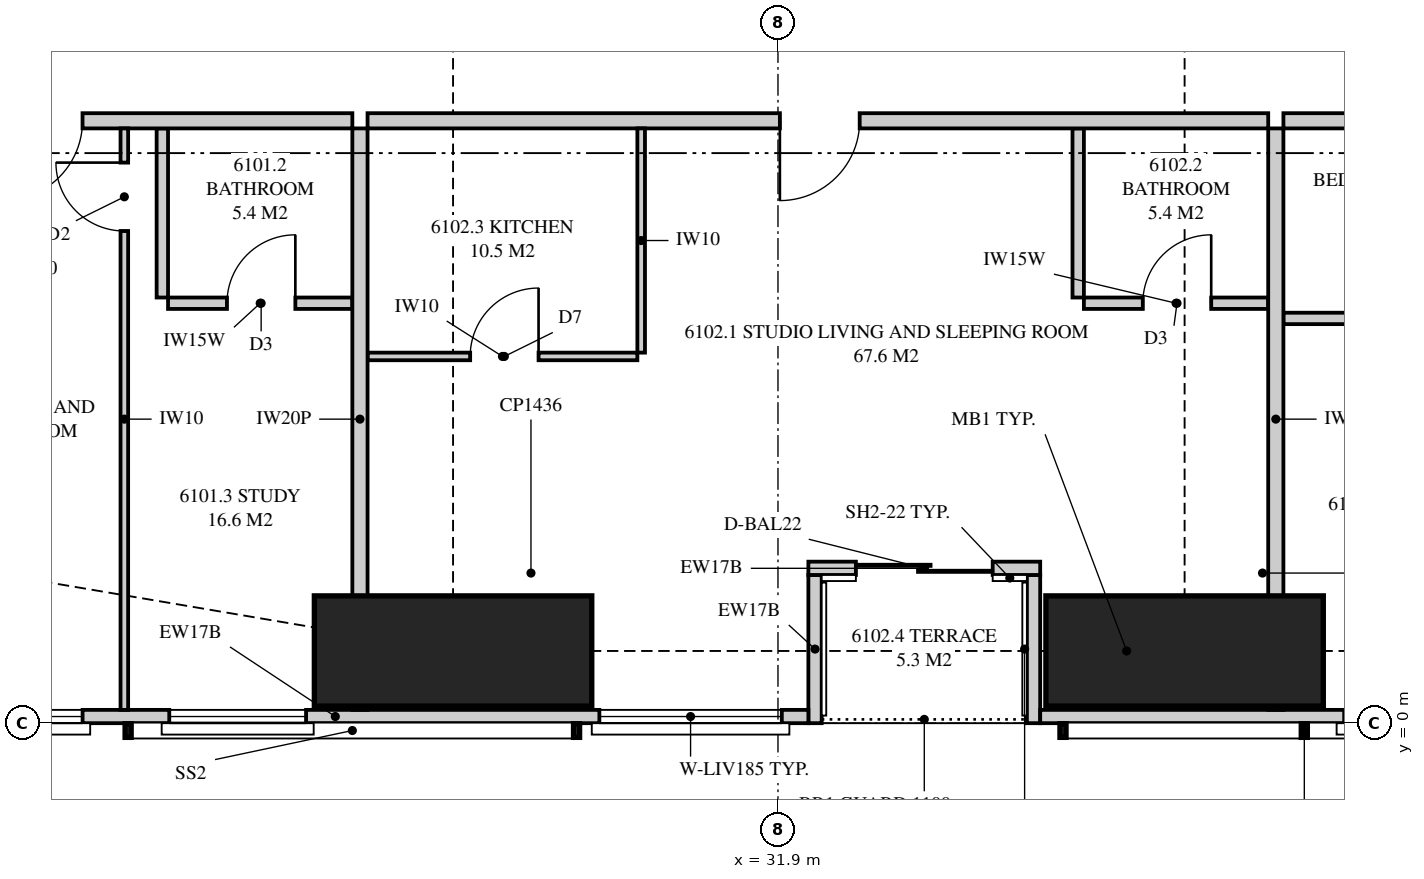
"""IFC4 building model, lengths in metres.
Left out: names, types, materials, properties, quantities, classifications, styles, units other than length and angle.
Written with IfcOpenShell. Run it as: python <this file> out.ifc"""

import sys

from ifc_helpers import new_model, si_unit, direction, frame, frame_2d, origin, origin_2d, place, context, subcontext, project, spatial, polyline, rectangle, outline, extrude, element, fill, save


model = new_model("IFC4")
c1 = context("Model", 3, precision=1e-05, world=origin(), true_north=direction((0.0, 1.0)))
c2 = subcontext(c1, "Body", "Model", "MODEL_VIEW")
j1 = project(units=[si_unit("LENGTHUNIT", "METRE"), si_unit("PLANEANGLEUNIT", "RADIAN")], contexts=[c1])
p1 = place(None, origin())
s1 = spatial("IfcSite", under=j1, at=p1, CompositionType="ELEMENT")
p2 = place(p1, origin())
s2 = spatial("IfcBuilding", under=s1, at=p2, CompositionType="ELEMENT")
p3 = place(p2, frame((0.0, 0.0, 224.95)))
s3 = spatial("IfcBuildingStorey", under=s2, at=p3, CompositionType="ELEMENT", Elevation=224.95)
for number, where, z_axis, x_axis in (
    (1, (27.625, 0.95, 0.0), (0.0, 0.0, 1.0), (0.0, 1.0, 0.0)),
    (2, (37.25, 0.95, 0.0), (0.0, 0.0, 1.0), (0.0, 1.0, 0.0)),
):
    element("IfcColumn", number, at=place(p3, frame(where, z_axis=z_axis, x_axis=x_axis)), inside=s3, PredefinedType="COLUMN", context=c2, shape_type="SweptSolid", body=[
        extrude(rectangle(XDim=1.45, YDim=3.65, at=origin_2d()), origin(), (0.0, 0.0, 1.0), 3.5),
    ])
p4 = place(p3, frame((19.851, 0.087, 0.0), z_axis=(0.0, 0.0, 1.0), x_axis=(1.0, 0.0, 0.0)))
e3 = element("IfcWall", 3, at=p4, inside=s3, PredefinedType="SOLIDWALL", context=c2, shape_type="SweptSolid", body=[
    extrude(outline(polyline([(0.0, 0.0), (12.449, 0.0), (12.449, 2.3), (7.774, 2.3), (7.774, 3.26), (7.642, 3.26), (7.642, 2.3), (7.559, 2.3), (7.559, 3.26), (0.0, 3.26), (0.0, 0.0)])), frame((0.0, 0.087, 0.0), z_axis=(0.0, -1.0, 0.0), x_axis=(1.0, 0.0, 0.0)), (0.0, 0.0, 1.0), 0.175),
])
p5 = place(p4, frame((0.5, 0.0, 0.4)))
e4 = element("IfcOpeningElement", 4, at=p5, cuts=e3, PredefinedType="OPENING", context=c2, shape_type="SweptSolid", body=[
    extrude(rectangle(XDim=2.4, YDim=1.85, at=frame_2d((1.2, 0.925))), frame((0.0, 0.097, 0.0), z_axis=(0.0, -1.0, 0.0), x_axis=(1.0, 0.0, 0.0)), (0.0, 0.0, 1.0), 0.195),
])
p6 = place(p4, frame((4.04, 0.0, 0.4)))
e5 = element("IfcOpeningElement", 5, at=p6, cuts=e3, PredefinedType="OPENING", context=c2, shape_type="SweptSolid", body=[
    extrude(rectangle(XDim=1.8, YDim=1.85, at=frame_2d((0.9, 0.925))), frame((0.0, 0.097, 0.0), z_axis=(0.0, -1.0, 0.0), x_axis=(1.0, 0.0, 0.0)), (0.0, 0.0, 1.0), 0.195),
])
p7 = place(p4, frame((9.699, 0.0, 0.4)))
e6 = element("IfcOpeningElement", 6, at=p7, cuts=e3, PredefinedType="OPENING", context=c2, shape_type="SweptSolid", body=[
    extrude(rectangle(XDim=2.4, YDim=1.85, at=frame_2d((1.2, 0.925))), frame((0.0, 0.097, 0.0), z_axis=(0.0, -1.0, 0.0), x_axis=(1.0, 0.0, 0.0)), (0.0, 0.0, 1.0), 0.195),
])
p8 = place(p3, frame((35.35, 0.087, 0.0), z_axis=(0.0, 0.0, 1.0), x_axis=(1.0, 0.0, 0.0)))
e7 = element("IfcWall", 7, at=p8, inside=s3, PredefinedType="SOLIDWALL", context=c2, shape_type="SweptSolid", body=[
    extrude(outline(polyline([(0.0, 0.0), (18.099, 0.0), (18.099, 3.26), (11.74, 3.26), (11.74, 2.3), (11.656, 2.3), (11.656, 3.26), (11.525, 3.26), (11.525, 2.3), (0.0, 2.3), (0.0, 0.0)])), frame((0.0, 0.087, 0.0), z_axis=(0.0, -1.0, 0.0), x_axis=(1.0, 0.0, 0.0)), (0.0, 0.0, 1.0), 0.175),
])
p9 = place(p8, frame((4.0, 0.0, 0.4)))
e8 = element("IfcOpeningElement", 8, at=p9, cuts=e7, PredefinedType="OPENING", context=c2, shape_type="SweptSolid", body=[
    extrude(rectangle(XDim=1.8, YDim=1.85, at=frame_2d((0.9, 0.925))), frame((0.0, 0.097, 0.0), z_axis=(0.0, -1.0, 0.0), x_axis=(1.0, 0.0, 0.0)), (0.0, 0.0, 1.0), 0.195),
])
p10 = place(p8, frame((7.6, 0.0, 0.4)))
e9 = element("IfcOpeningElement", 9, at=p10, cuts=e7, PredefinedType="OPENING", context=c2, shape_type="SweptSolid", body=[
    extrude(rectangle(XDim=1.8, YDim=1.85, at=frame_2d((0.9, 0.925))), frame((0.0, 0.097, 0.0), z_axis=(0.0, -1.0, 0.0), x_axis=(1.0, 0.0, 0.0)), (0.0, 0.0, 1.0), 0.195),
])
p11 = place(p8, frame((13.51, 0.0, 0.4)))
e10 = element("IfcOpeningElement", 10, at=p11, cuts=e7, PredefinedType="OPENING", context=c2, shape_type="SweptSolid", body=[
    extrude(rectangle(XDim=2.4, YDim=1.85, at=frame_2d((1.2, 0.925))), frame((0.0, 0.097, 0.0), z_axis=(0.0, -1.0, 0.0), x_axis=(1.0, 0.0, 0.0)), (0.0, 0.0, 1.0), 0.195),
])
p12 = place(p3, frame((32.3, 2.038, 0.0), z_axis=(0.0, 0.0, 1.0), x_axis=(1.0, 0.0, 0.0)))
e11 = element("IfcWall", 11, at=p12, inside=s3, PredefinedType="SOLIDWALL", context=c2, shape_type="SweptSolid", body=[
    extrude(rectangle(XDim=3.05, YDim=0.175, at=frame_2d((1.525, 0.0))), origin(), (0.0, 0.0, 1.0), 3.26),
])
p13 = place(p12, frame((0.625, 0.0, 0.0)))
e12 = element("IfcOpeningElement", 12, at=p13, cuts=e11, PredefinedType="OPENING", context=c2, shape_type="SweptSolid", body=[
    extrude(rectangle(XDim=1.8, YDim=2.25, at=frame_2d((0.9, 1.125))), frame((0.0, 0.097, 0.0), z_axis=(0.0, -1.0, 0.0), x_axis=(1.0, 0.0, 0.0)), (0.0, 0.0, 1.0), 0.195),
])
for number, where, z_axis, x_axis in (
    (13, (32.387, 0.0, 0.0), (0.0, 0.0, 1.0), (0.0, 1.0, 0.0)),
    (14, (35.262, 0.0, 0.0), (0.0, 0.0, 1.0), (0.0, 1.0, 0.0)),
):
    element("IfcWall", number, at=place(p3, frame(where, z_axis=z_axis, x_axis=x_axis)), inside=s3, PredefinedType="SOLIDWALL", context=c2, shape_type="SweptSolid", body=[
        extrude(outline(polyline([(0.0, 0.0), (1.95, 0.0), (1.95, 3.26), (1.75, 3.26), (1.75, 2.3), (0.15, 2.3), (0.15, 3.26), (0.0, 3.26), (0.0, 0.0)])), frame((0.0, 0.087, 0.0), z_axis=(0.0, -1.0, 0.0), x_axis=(1.0, 0.0, 0.0)), (0.0, 0.0, 1.0), 0.175),
    ])
p14 = place(p3, frame((26.4, 0.175, 0.0), z_axis=(0.0, 0.0, 1.0), x_axis=(0.0, 1.0, 0.0)))
e15 = element("IfcWall", 15, at=p14, inside=s3, PredefinedType="PARTITIONING", context=c2, shape_type="SweptSolid", body=[
    extrude(outline(polyline([(0.06, 3.26), (0.0, 3.26), (0.0, 0.0), (0.529, 0.0), (0.529, 0.31), (1.021, 0.31), (1.021, 0.0), (7.65, 0.0), (7.65, 2.66), (1.906, 2.66), (1.906, 2.3), (1.021, 2.3), (1.021, 1.99), (0.529, 1.99), (0.529, 2.3), (0.06, 2.3), (0.06, 3.26)])), frame((0.0, 0.1, 0.0), z_axis=(0.0, -1.0, 0.0), x_axis=(1.0, 0.0, 0.0)), (0.0, 0.0, 1.0), 0.2),
])
p15 = place(p3, frame((18.0, 7.925, 0.0), z_axis=(0.0, 0.0, 1.0), x_axis=(1.0, 0.0, 0.0)))
e16 = element("IfcWall", 16, at=p15, inside=s3, PredefinedType="PARTITIONING", context=c2, shape_type="SweptSolid", body=[
    extrude(outline(polyline([(0.0, 0.0), (8.3, 0.0), (8.3, 3.26), (1.839, 3.26), (1.839, 2.3), (0.0, 2.3), (0.0, 3.26), (0.0, 0.0)])), frame((0.0, 0.1, 0.0), z_axis=(0.0, -1.0, 0.0), x_axis=(1.0, 0.0, 0.0)), (0.0, 0.0, 1.0), 0.2),
])
p16 = place(p15, frame((3.7, 0.0, 0.0)))
e17 = element("IfcOpeningElement", 17, at=p16, cuts=e16, PredefinedType="OPENING", context=c2, shape_type="SweptSolid", body=[
    extrude(rectangle(XDim=1.05, YDim=2.2, at=frame_2d((0.525, 1.1))), frame((0.0, 0.11, 0.0), z_axis=(0.0, -1.0, 0.0), x_axis=(1.0, 0.0, 0.0)), (0.0, 0.0, 1.0), 0.22),
])
p17 = place(p3, frame((23.875, 5.525, 0.0), z_axis=(0.0, 0.0, 1.0), x_axis=(1.0, 0.0, 0.0)))
e18 = element("IfcWall", 18, at=p17, inside=s3, PredefinedType="PLUMBINGWALL", context=c2, shape_type="SweptSolid", body=[
    extrude(rectangle(XDim=2.425, YDim=0.15, at=frame_2d((1.212, 0.0))), origin(), (0.0, 0.0, 1.0), 3.26),
])
p18 = place(p17, frame((0.775, 0.0, 0.0)))
e19 = element("IfcOpeningElement", 19, at=p18, cuts=e18, PredefinedType="OPENING", context=c2, shape_type="SweptSolid", body=[
    extrude(rectangle(XDim=0.9, YDim=2.1, at=frame_2d((0.45, 1.05))), frame((0.0, 0.085, 0.0), z_axis=(0.0, -1.0, 0.0), x_axis=(1.0, 0.0, 0.0)), (0.0, 0.0, 1.0), 0.17),
])
p19 = place(p3, frame((23.8, 5.6, 0.0), z_axis=(0.0, 0.0, 1.0), x_axis=(0.0, 1.0, 0.0)))
e20 = element("IfcWall", 20, at=p19, inside=s3, PredefinedType="PLUMBINGWALL", context=c2, shape_type="SweptSolid", body=[
    extrude(rectangle(XDim=2.225, YDim=0.15, at=frame_2d((1.112, 0.0))), origin(), (0.0, 0.0, 1.0), 3.26),
])
p20 = place(p3, frame((23.3, 0.175, 0.0), z_axis=(0.0, 0.0, 1.0), x_axis=(0.0, 1.0, 0.0)))
e21 = element("IfcWall", 21, at=p20, inside=s3, PredefinedType="PARTITIONING", context=c2, shape_type="SweptSolid", body=[
    extrude(outline(polyline([(0.0, 0.0), (7.65, 0.0), (7.65, 3.26), (2.38, 3.26), (2.38, 2.3), (0.636, 2.3), (0.636, 3.26), (0.0, 3.26), (0.0, 0.0)])), frame((0.0, 0.05, 0.0), z_axis=(0.0, -1.0, 0.0), x_axis=(1.0, 0.0, 0.0)), (0.0, 0.0, 1.0), 0.1),
])
p21 = place(p20, frame((6.3, 0.0, 0.0)))
e22 = element("IfcOpeningElement", 22, at=p21, cuts=e21, PredefinedType="OPENING", context=c2, shape_type="SweptSolid", body=[
    extrude(rectangle(XDim=0.9, YDim=2.1, at=frame_2d((0.45, 1.05))), frame((0.0, 0.06, 0.0), z_axis=(0.0, -1.0, 0.0), x_axis=(1.0, 0.0, 0.0)), (0.0, 0.0, 1.0), 0.12),
])
p22 = place(p3, frame((38.45, 0.175, 0.0), z_axis=(0.0, 0.0, 1.0), x_axis=(0.0, 1.0, 0.0)))
e23 = element("IfcWall", 23, at=p22, inside=s3, PredefinedType="PARTITIONING", context=c2, shape_type="SweptSolid", body=[
    extrude(outline(polyline([(0.529, 2.3), (0.0, 2.3), (0.0, 0.0), (0.529, 0.0), (0.529, 0.338), (1.021, 0.338), (1.021, 0.0), (7.65, 0.0), (7.65, 2.66), (1.685, 2.66), (1.685, 2.3), (1.021, 2.3), (1.021, 1.962), (0.529, 1.962), (0.529, 2.3)])), frame((0.0, 0.1, 0.0), z_axis=(0.0, -1.0, 0.0), x_axis=(1.0, 0.0, 0.0)), (0.0, 0.0, 1.0), 0.2),
])
p23 = place(p3, frame((26.5, 7.925, 0.0), z_axis=(0.0, 0.0, 1.0), x_axis=(1.0, 0.0, 0.0)))
e24 = element("IfcWall", 24, at=p23, inside=s3, PredefinedType="PARTITIONING", context=c2, shape_type="SweptSolid", body=[
    extrude(outline(polyline([(0.0, 0.0), (11.85, 0.0), (11.85, 3.26), (11.85, 2.66), (9.44, 2.66), (9.44, 3.26), (2.435, 3.26), (2.435, 2.66), (0.0, 2.66), (0.0, 3.26), (0.0, 0.0)])), frame((0.0, 0.1, 0.0), z_axis=(0.0, -1.0, 0.0), x_axis=(1.0, 0.0, 0.0)), (0.0, 0.0, 1.0), 0.2),
])
p24 = place(p23, frame((5.425, 0.0, 0.0)))
e25 = element("IfcOpeningElement", 25, at=p24, cuts=e24, PredefinedType="OPENING", context=c2, shape_type="SweptSolid", body=[
    extrude(rectangle(XDim=1.05, YDim=2.2, at=frame_2d((0.525, 1.1))), frame((0.0, 0.11, 0.0), z_axis=(0.0, -1.0, 0.0), x_axis=(1.0, 0.0, 0.0)), (0.0, 0.0, 1.0), 0.22),
])
p25 = place(p3, frame((35.925, 5.525, 0.0), z_axis=(0.0, 0.0, 1.0), x_axis=(1.0, 0.0, 0.0)))
e26 = element("IfcWall", 26, at=p25, inside=s3, PredefinedType="PLUMBINGWALL", context=c2, shape_type="SweptSolid", body=[
    extrude(outline(polyline([(0.0, 0.0), (2.425, 0.0), (2.425, 3.26), (2.425, 2.66), (0.04, 2.66), (0.04, 3.26), (0.0, 3.26), (0.0, 0.0)])), frame((0.0, 0.075, 0.0), z_axis=(0.0, -1.0, 0.0), x_axis=(1.0, 0.0, 0.0)), (0.0, 0.0, 1.0), 0.15),
])
p26 = place(p25, frame((0.775, 0.0, 0.0)))
e27 = element("IfcOpeningElement", 27, at=p26, cuts=e26, PredefinedType="OPENING", context=c2, shape_type="SweptSolid", body=[
    extrude(rectangle(XDim=0.9, YDim=2.1, at=frame_2d((0.45, 1.05))), frame((0.0, 0.085, 0.0), z_axis=(0.0, -1.0, 0.0), x_axis=(1.0, 0.0, 0.0)), (0.0, 0.0, 1.0), 0.17),
])
p27 = place(p3, frame((35.85, 5.6, 0.0), z_axis=(0.0, 0.0, 1.0), x_axis=(0.0, 1.0, 0.0)))
e28 = element("IfcWall", 28, at=p27, inside=s3, PredefinedType="PLUMBINGWALL", context=c2, shape_type="SweptSolid", body=[
    extrude(rectangle(XDim=2.225, YDim=0.15, at=frame_2d((1.112, 0.0))), origin(), (0.0, 0.0, 1.0), 3.26),
])
p28 = place(p3, frame((26.5, 4.825, 0.0), z_axis=(0.0, 0.0, 1.0), x_axis=(1.0, 0.0, 0.0)))
e29 = element("IfcWall", 29, at=p28, inside=s3, PredefinedType="PARTITIONING", context=c2, shape_type="SweptSolid", body=[
    extrude(outline(polyline([(0.0, 0.0), (3.55, 0.0), (3.55, 3.26), (2.385, 3.26), (2.385, 2.66), (0.0, 2.66), (0.0, 3.26), (0.0, 0.0)])), frame((0.0, 0.05, 0.0), z_axis=(0.0, -1.0, 0.0), x_axis=(1.0, 0.0, 0.0)), (0.0, 0.0, 1.0), 0.1),
])
p29 = place(p28, frame((1.35, 0.0, 0.0)))
e30 = element("IfcOpeningElement", 30, at=p29, cuts=e29, PredefinedType="OPENING", context=c2, shape_type="SweptSolid", body=[
    extrude(rectangle(XDim=0.9, YDim=2.1, at=frame_2d((0.45, 1.05))), frame((0.0, 0.06, 0.0), z_axis=(0.0, -1.0, 0.0), x_axis=(1.0, 0.0, 0.0)), (0.0, 0.0, 1.0), 0.12),
])
p30 = place(p3, frame((30.1, 4.875, 0.0), z_axis=(0.0, 0.0, 1.0), x_axis=(0.0, 1.0, 0.0)))
e31 = element("IfcWall", 31, at=p30, inside=s3, PredefinedType="PARTITIONING", context=c2, shape_type="SweptSolid", body=[
    extrude(rectangle(XDim=2.95, YDim=0.1, at=frame_2d((1.475, 0.0))), origin(), (0.0, 0.0, 1.0), 3.26),
])
p31 = place(p3, frame((38.55, 7.925, 0.0), z_axis=(0.0, 0.0, 1.0), x_axis=(1.0, 0.0, 0.0)))
e32 = element("IfcWall", 32, at=p31, inside=s3, PredefinedType="PARTITIONING", context=c2, shape_type="SweptSolid", body=[
    extrude(outline(polyline([(0.0, 0.0), (7.325, 0.0), (7.325, 3.26), (7.325, 2.66), (7.015, 2.66), (7.015, 3.26), (0.01, 3.26), (0.01, 2.66), (0.0, 2.66), (0.0, 3.26), (0.0, 0.0)])), frame((0.0, 0.1, 0.0), z_axis=(0.0, -1.0, 0.0), x_axis=(1.0, 0.0, 0.0)), (0.0, 0.0, 1.0), 0.2),
])
p32 = place(p31, frame((6.125, 0.0, 0.0)))
e33 = element("IfcOpeningElement", 33, at=p32, cuts=e32, PredefinedType="OPENING", context=c2, shape_type="SweptSolid", body=[
    extrude(rectangle(XDim=1.05, YDim=2.2, at=frame_2d((0.525, 1.1))), frame((0.0, 0.11, 0.0), z_axis=(0.0, -1.0, 0.0), x_axis=(1.0, 0.0, 0.0)), (0.0, 0.0, 1.0), 0.22),
])
p33 = place(p3, frame((38.55, 5.325, 0.0), z_axis=(0.0, 0.0, 1.0), x_axis=(1.0, 0.0, 0.0)))
e34 = element("IfcWall", 34, at=p33, inside=s3, PredefinedType="PLUMBINGWALL", context=c2, shape_type="SweptSolid", body=[
    extrude(rectangle(XDim=3.45, YDim=0.15, at=frame_2d((1.725, 0.0))), origin(), (0.0, 0.0, 1.0), 3.26),
])
p34 = place(p33, frame((2.15, 0.0, 0.0)))
e35 = element("IfcOpeningElement", 35, at=p34, cuts=e34, PredefinedType="OPENING", context=c2, shape_type="SweptSolid", body=[
    extrude(rectangle(XDim=0.9, YDim=2.1, at=frame_2d((0.45, 1.05))), frame((0.0, 0.085, 0.0), z_axis=(0.0, -1.0, 0.0), x_axis=(1.0, 0.0, 0.0)), (0.0, 0.0, 1.0), 0.17),
])
p35 = place(p5, origin())
e36 = element("IfcWindow", 36, at=p35, inside=s3, PartitioningType="SINGLE_PANEL", PredefinedType="WINDOW", context=c2, shape_type="SweptSolid", body=[
    extrude(rectangle(XDim=2.4, YDim=1.85, at=frame_2d((1.2, 0.925))), frame((0.0, 0.03, 0.0), z_axis=(0.0, -1.0, 0.0), x_axis=(1.0, 0.0, 0.0)), (0.0, 0.0, 1.0), 0.06),
])
fill(e4, e36)
p36 = place(p6, origin())
e37 = element("IfcWindow", 37, at=p36, inside=s3, PartitioningType="SINGLE_PANEL", PredefinedType="WINDOW", context=c2, shape_type="SweptSolid", body=[
    extrude(rectangle(XDim=1.8, YDim=1.85, at=frame_2d((0.9, 0.925))), frame((0.0, 0.03, 0.0), z_axis=(0.0, -1.0, 0.0), x_axis=(1.0, 0.0, 0.0)), (0.0, 0.0, 1.0), 0.06),
])
fill(e5, e37)
p37 = place(p13, origin())
e38 = element("IfcDoor", 38, at=p37, inside=s3, OperationType="SLIDING_TO_LEFT", PredefinedType="DOOR", context=c2, shape_type="SweptSolid", body=[
    extrude(rectangle(XDim=1.8, YDim=2.25, at=frame_2d((0.9, 1.125))), frame((0.0, 0.025, 0.0), z_axis=(0.0, -1.0, 0.0), x_axis=(1.0, 0.0, 0.0)), (0.0, 0.0, 1.0), 0.05),
])
fill(e12, e38)
p38 = place(p7, origin())
e39 = element("IfcWindow", 39, at=p38, inside=s3, PartitioningType="SINGLE_PANEL", PredefinedType="WINDOW", context=c2, shape_type="SweptSolid", body=[
    extrude(rectangle(XDim=2.4, YDim=1.85, at=frame_2d((1.2, 0.925))), frame((0.0, 0.03, 0.0), z_axis=(0.0, -1.0, 0.0), x_axis=(1.0, 0.0, 0.0)), (0.0, 0.0, 1.0), 0.06),
])
fill(e6, e39)
p39 = place(p9, origin())
e40 = element("IfcWindow", 40, at=p39, inside=s3, PartitioningType="SINGLE_PANEL", PredefinedType="WINDOW", context=c2, shape_type="SweptSolid", body=[
    extrude(rectangle(XDim=1.8, YDim=1.85, at=frame_2d((0.9, 0.925))), frame((0.0, 0.03, 0.0), z_axis=(0.0, -1.0, 0.0), x_axis=(1.0, 0.0, 0.0)), (0.0, 0.0, 1.0), 0.06),
])
fill(e8, e40)
p40 = place(p16, frame((1.05, 0.0, 0.0), z_axis=(0.0, 0.0, 1.0), x_axis=(-1.0, 0.0, 0.0)))
e41 = element("IfcDoor", 41, at=p40, inside=s3, OperationType="SINGLE_SWING_RIGHT", PredefinedType="DOOR", context=c2, shape_type="SweptSolid", body=[
    extrude(rectangle(XDim=1.05, YDim=2.2, at=frame_2d((0.525, 1.1))), frame((0.0, 0.025, 0.0), z_axis=(0.0, -1.0, 0.0), x_axis=(1.0, 0.0, 0.0)), (0.0, 0.0, 1.0), 0.05),
])
fill(e17, e41)
p41 = place(p18, origin())
e42 = element("IfcDoor", 42, at=p41, inside=s3, OperationType="SINGLE_SWING_RIGHT", PredefinedType="DOOR", context=c2, shape_type="SweptSolid", body=[
    extrude(rectangle(XDim=0.9, YDim=2.1, at=frame_2d((0.45, 1.05))), frame((0.0, 0.025, 0.0), z_axis=(0.0, -1.0, 0.0), x_axis=(1.0, 0.0, 0.0)), (0.0, 0.0, 1.0), 0.05),
])
fill(e19, e42)
p42 = place(p21, origin())
e43 = element("IfcDoor", 43, at=p42, inside=s3, OperationType="SINGLE_SWING_RIGHT", PredefinedType="DOOR", context=c2, shape_type="SweptSolid", body=[
    extrude(rectangle(XDim=0.9, YDim=2.1, at=frame_2d((0.45, 1.05))), frame((0.0, 0.025, 0.0), z_axis=(0.0, -1.0, 0.0), x_axis=(1.0, 0.0, 0.0)), (0.0, 0.0, 1.0), 0.05),
])
fill(e22, e43)
p43 = place(p24, frame((1.05, 0.0, 0.0), z_axis=(0.0, 0.0, 1.0), x_axis=(-1.0, 0.0, 0.0)))
e44 = element("IfcDoor", 44, at=p43, inside=s3, OperationType="SINGLE_SWING_RIGHT", PredefinedType="DOOR", context=c2, shape_type="SweptSolid", body=[
    extrude(rectangle(XDim=1.05, YDim=2.2, at=frame_2d((0.525, 1.1))), frame((0.0, 0.025, 0.0), z_axis=(0.0, -1.0, 0.0), x_axis=(1.0, 0.0, 0.0)), (0.0, 0.0, 1.0), 0.05),
])
fill(e25, e44)
p44 = place(p26, origin())
e45 = element("IfcDoor", 45, at=p44, inside=s3, OperationType="SINGLE_SWING_RIGHT", PredefinedType="DOOR", context=c2, shape_type="SweptSolid", body=[
    extrude(rectangle(XDim=0.9, YDim=2.1, at=frame_2d((0.45, 1.05))), frame((0.0, 0.025, 0.0), z_axis=(0.0, -1.0, 0.0), x_axis=(1.0, 0.0, 0.0)), (0.0, 0.0, 1.0), 0.05),
])
fill(e27, e45)
p45 = place(p29, origin())
e46 = element("IfcDoor", 46, at=p45, inside=s3, OperationType="SINGLE_SWING_RIGHT", PredefinedType="DOOR", context=c2, shape_type="SweptSolid", body=[
    extrude(rectangle(XDim=0.9, YDim=2.1, at=frame_2d((0.45, 1.05))), frame((0.0, 0.025, 0.0), z_axis=(0.0, -1.0, 0.0), x_axis=(1.0, 0.0, 0.0)), (0.0, 0.0, 1.0), 0.05),
])
fill(e30, e46)
save(model, sys.argv[1])
